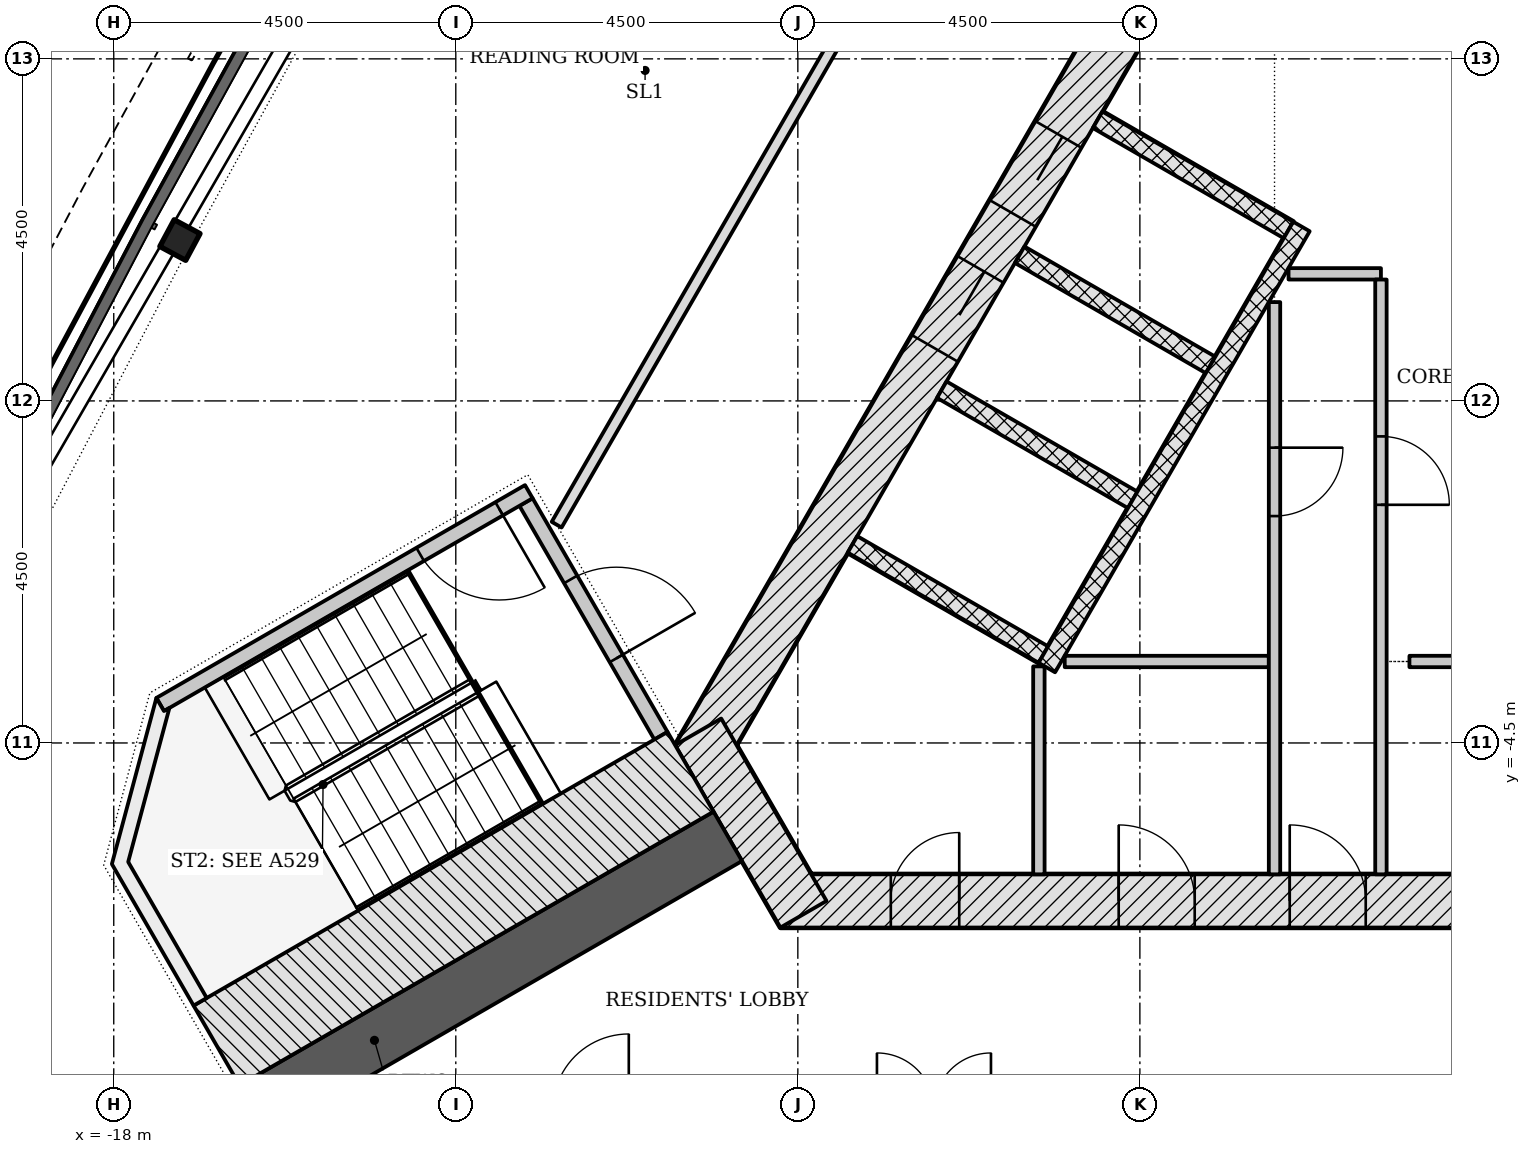
"""IFC4 building model, lengths in metres.
Left out: names, types, materials, properties, quantities, classifications, styles, units other than length and angle.
Written with IfcOpenShell. Run it as: python <this file> out.ifc"""

import sys

from ifc_helpers import new_model, si_unit, direction, frame, frame_2d, origin, origin_2d, place, context, subcontext, project, spatial, polyline, rectangle, i_section, outline, extrude, element, fill, save


model = new_model("IFC4")
c1 = context("Model", 3, precision=1e-05, world=origin(), true_north=direction((0.0, 1.0)))
c2 = subcontext(c1, "Body", "Model", "MODEL_VIEW")
j1 = project(units=[si_unit("LENGTHUNIT", "METRE"), si_unit("PLANEANGLEUNIT", "RADIAN")], contexts=[c1])
p1 = place(None, origin())
s1 = spatial("IfcSite", under=j1, at=p1, CompositionType="ELEMENT")
p2 = place(p1, origin())
s2 = spatial("IfcBuilding", under=s1, at=p2, CompositionType="ELEMENT")
p3 = place(p2, frame((0.0, 0.0, 150.9)))
s3 = spatial("IfcBuildingStorey", under=s2, at=p3, CompositionType="ELEMENT", Elevation=150.9)
p4 = place(p3, frame((-9.229, -6.578, -0.2), z_axis=(0.0, 0.0, 1.0), x_axis=(1.0, 0.0, 0.0)))
e1 = element("IfcWall", 1, at=p4, inside=s3, PredefinedType="SHEAR", context=c2, shape_type="SweptSolid", body=[
    extrude(rectangle(XDim=18.458, YDim=0.7, at=frame_2d((9.229, 0.0))), origin(), (0.0, 0.0, 1.0), 3.6),
])
p5 = place(p4, frame((6.7, 0.0, 0.2)))
e2 = element("IfcOpeningElement", 2, at=p5, cuts=e1, PredefinedType="OPENING", context=c2, shape_type="SweptSolid", body=[
    extrude(rectangle(XDim=1.0, YDim=2.1, at=frame_2d((0.5, 1.05))), frame((0.0, 0.36, 0.0), z_axis=(0.0, -1.0, 0.0), x_axis=(1.0, 0.0, 0.0)), (0.0, 0.0, 1.0), 0.72),
])
p6 = place(p4, frame((1.452, 0.0, 0.2)))
e3 = element("IfcOpeningElement", 3, at=p6, cuts=e1, PredefinedType="OPENING", context=c2, shape_type="SweptSolid", body=[
    extrude(rectangle(XDim=0.9, YDim=2.1, at=frame_2d((0.45, 1.05))), frame((0.0, 0.36, 0.0), z_axis=(0.0, -1.0, 0.0), x_axis=(1.0, 0.0, 0.0)), (0.0, 0.0, 1.0), 0.72),
])
p7 = place(p4, frame((4.45, 0.0, 0.2)))
e4 = element("IfcOpeningElement", 4, at=p7, cuts=e1, PredefinedType="OPENING", context=c2, shape_type="SweptSolid", body=[
    extrude(rectangle(XDim=1.0, YDim=2.1, at=frame_2d((0.5, 1.05))), frame((0.0, 0.36, 0.0), z_axis=(0.0, -1.0, 0.0), x_axis=(1.0, 0.0, 0.0)), (0.0, 0.0, 1.0), 0.72),
])
p8 = place(p4, frame((12.477, 0.0, 0.2)))
e5 = element("IfcOpeningElement", 5, at=p8, cuts=e1, PredefinedType="OPENING", context=c2, shape_type="SweptSolid", body=[
    extrude(rectangle(XDim=1.0, YDim=2.1, at=frame_2d((0.5, 1.05))), frame((0.0, 0.36, 0.0), z_axis=(0.0, -1.0, 0.0), x_axis=(1.0, 0.0, 0.0)), (0.0, 0.0, 1.0), 0.72),
])
p9 = place(p3, frame((-1.083, 11.281, -0.2), z_axis=(0.0, 0.0, 1.0), x_axis=(-0.500001446645, -0.866024568562, 0.0)))
e6 = element("IfcWall", 6, at=p9, inside=s3, PredefinedType="SHEAR", context=c2, shape_type="SweptSolid", body=[
    extrude(rectangle(XDim=18.458, YDim=0.7, at=frame_2d((9.229, 0.0))), origin(), (0.0, 0.0, 1.0), 3.6),
])
p10 = place(p9, frame((8.979, 0.0, 0.2)))
e7 = element("IfcOpeningElement", 7, at=p10, cuts=e6, PredefinedType="OPENING", context=c2, shape_type="SweptSolid", body=[
    extrude(rectangle(XDim=1.2, YDim=2.1, at=frame_2d((0.6, 1.05))), frame((0.0, 0.36, 0.0), z_axis=(0.0, -1.0, 0.0), x_axis=(1.0, 0.0, 0.0)), (0.0, 0.0, 1.0), 0.72),
])
p11 = place(p9, frame((11.029, 0.0, 0.2)))
e8 = element("IfcOpeningElement", 8, at=p11, cuts=e6, PredefinedType="OPENING", context=c2, shape_type="SweptSolid", body=[
    extrude(rectangle(XDim=1.2, YDim=2.1, at=frame_2d((0.6, 1.05))), frame((0.0, 0.36, 0.0), z_axis=(0.0, -1.0, 0.0), x_axis=(1.0, 0.0, 0.0)), (0.0, 0.0, 1.0), 0.72),
])
p12 = place(p3, frame((-10.311, -4.353, -0.2), z_axis=(0.0, 0.0, 1.0), x_axis=(0.500042739161, -0.866000726912, 0.0)))
e9 = element("IfcWall", 9, at=p12, inside=s3, PredefinedType="SHEAR", context=c2, shape_type="SweptSolid", body=[
    extrude(rectangle(XDim=2.771, YDim=0.7, at=frame_2d((1.386, 0.0))), origin(), (0.0, 0.0, 1.0), 3.6),
])
p13 = place(p3, frame((-9.922, -5.728, -0.2), z_axis=(0.0, 0.0, 1.0), x_axis=(-0.86602614826, -0.499998710529, 0.0)))
e10 = element("IfcWall", 10, at=p13, inside=s3, PredefinedType="SHEAR", context=c2, shape_type="SweptSolid", body=[
    extrude(rectangle(XDim=10.735, YDim=0.75, at=frame_2d((5.368, 0.0))), origin(), (0.0, 0.0, 1.0), 3.6),
])
p14 = place(p3, frame((-17.129, 2.116, -0.2), z_axis=(0.0, 0.0, 1.0), x_axis=(-0.472835267666, -0.881150843869, 0.0)))
e11 = element("IfcColumn", 11, at=p14, inside=s3, PredefinedType="COLUMN", context=c2, shape_type="SweptSolid", body=[
    extrude(i_section(OverallWidth=0.399, OverallDepth=0.386, WebThickness=0.021, FlangeThickness=0.033, FilletRadius=0.015, at=origin_2d()), origin(), (0.0, 0.0, 1.0), 3.6),
])
p15 = place(p3, origin())
e12 = element("IfcWall", 12, at=p15, inside=s3, PredefinedType="NOTDEFINED", context=c2, shape_type="SweptSolid", body=[
    extrude(outline(polyline([(-21.704, -5.64), (-23.061, -8.494), (-23.472, -9.826), (-23.507, -11.219), (-23.163, -12.569), (-22.466, -13.775), (-21.469, -14.748), (-20.245, -15.414), (-18.887, -15.724), (-15.736, -15.976), (-15.712, -15.677), (-18.841, -15.427), (-20.138, -15.131), (-21.289, -14.504), (-22.227, -13.589), (-22.882, -12.455), (-23.206, -11.185), (-23.173, -9.875), (-22.781, -8.604), (-21.433, -5.769), (-21.704, -5.64)])), origin(), (0.0, 0.0, 1.0), 3.3),
])
for number, where, z_axis, x_axis in (
    (13, (-5.056, 3.699, -0.2), (0.0, 0.0, 1.0), (0.866, -0.5, 0.0)),
    (14, (-6.081, 1.923, -0.2), (0.0, 0.0, 1.0), (0.866, -0.5, 0.0)),
    (15, (-7.106, 0.148, -0.2), (0.0, 0.0, 1.0), (0.866, -0.5, 0.0)),
    (16, (-8.281, -1.887, -0.2), (0.0, 0.0, 1.0), (0.866, -0.5, 0.0)),
):
    element("IfcWall", number, at=place(p3, frame(where, z_axis=z_axis, x_axis=x_axis)), inside=s3, PredefinedType="PARTITIONING", context=c2, shape_type="SweptSolid", body=[
        extrude(rectangle(XDim=2.9, YDim=0.25, at=frame_2d((1.45, 0.0))), origin(), (0.0, 0.0, 1.0), 3.6),
    ])
p16 = place(p3, frame((-2.374, 2.294, 0.0), z_axis=(0.0, 0.0, 1.0), x_axis=(-0.500003174267, -0.866023571113, 0.0)))
e17 = element("IfcWall", 17, at=p16, inside=s3, PredefinedType="PARTITIONING", context=c2, shape_type="SweptSolid", body=[
    extrude(rectangle(XDim=6.7, YDim=0.25, at=frame_2d((3.35, 0.0))), origin(), (0.0, 0.0, 1.0), 3.4),
])
p17 = place(p3, frame((-5.829, -3.492, 0.0), z_axis=(0.0, 0.0, 1.0), x_axis=(0.0, -1.0, 0.0)))
e18 = element("IfcWall", 18, at=p17, inside=s3, PredefinedType="PARTITIONING", context=c2, shape_type="SweptSolid", body=[
    extrude(rectangle(XDim=2.736, YDim=0.15, at=frame_2d((1.368, 0.0))), origin(), (0.0, 0.0, 1.0), 3.4),
])
p18 = place(p3, frame((-5.489, -3.428, 0.0), z_axis=(0.0, 0.0, 1.0), x_axis=(1.0, 0.0, 0.0)))
e19 = element("IfcWall", 19, at=p18, inside=s3, PredefinedType="PARTITIONING", context=c2, shape_type="SweptSolid", body=[
    extrude(rectangle(XDim=2.685, YDim=0.15, at=frame_2d((1.343, 0.0))), origin(), (0.0, 0.0, 1.0), 3.4),
])
p19 = place(p3, frame((-2.729, 1.3, 0.0), z_axis=(0.0, 0.0, 1.0), x_axis=(0.0, -1.0, 0.0)))
e20 = element("IfcWall", 20, at=p19, inside=s3, PredefinedType="PARTITIONING", context=c2, shape_type="SweptSolid", body=[
    extrude(rectangle(XDim=7.528, YDim=0.15, at=frame_2d((3.764, 0.0))), origin(), (0.0, 0.0, 1.0), 3.4),
])
p20 = place(p19, frame((1.915, 0.0, 0.0)))
e21 = element("IfcOpeningElement", 21, at=p20, cuts=e20, PredefinedType="OPENING", context=c2, shape_type="SweptSolid", body=[
    extrude(rectangle(XDim=0.9, YDim=2.1, at=frame_2d((0.45, 1.05))), frame((0.0, 0.085, 0.0), z_axis=(0.0, -1.0, 0.0), x_axis=(1.0, 0.0, 0.0)), (0.0, 0.0, 1.0), 0.17),
])
p21 = place(p3, frame((-2.544, 1.672, 0.0), z_axis=(0.0, 0.0, 1.0), x_axis=(1.0, 0.0, 0.0)))
e22 = element("IfcWall", 22, at=p21, inside=s3, PredefinedType="PARTITIONING", context=c2, shape_type="SweptSolid", body=[
    extrude(rectangle(XDim=1.216, YDim=0.15, at=frame_2d((0.608, 0.0))), origin(), (0.0, 0.0, 1.0), 3.4),
])
p22 = place(p3, frame((-1.329, 1.597, 0.0), z_axis=(0.0, 0.0, 1.0), x_axis=(0.0, -1.0, 0.0)))
e23 = element("IfcWall", 23, at=p22, inside=s3, PredefinedType="PARTITIONING", context=c2, shape_type="SweptSolid", body=[
    extrude(rectangle(XDim=7.825, YDim=0.15, at=frame_2d((3.913, 0.0))), origin(), (0.0, 0.0, 1.0), 3.4),
])
p23 = place(p22, frame((2.063, 0.0, 0.0)))
e24 = element("IfcOpeningElement", 24, at=p23, cuts=e23, PredefinedType="OPENING", context=c2, shape_type="SweptSolid", body=[
    extrude(rectangle(XDim=0.9, YDim=2.1, at=frame_2d((0.45, 1.05))), frame((0.0, 0.085, 0.0), z_axis=(0.0, -1.0, 0.0), x_axis=(1.0, 0.0, 0.0)), (0.0, 0.0, 1.0), 0.17),
])
p24 = place(p3, frame((-0.954, -3.428, 0.0), z_axis=(0.0, 0.0, 1.0), x_axis=(1.0, 0.0, 0.0)))
e25 = element("IfcWall", 25, at=p24, inside=s3, PredefinedType="PARTITIONING", context=c2, shape_type="SweptSolid", body=[
    extrude(rectangle(XDim=10.08, YDim=0.15, at=frame_2d((5.04, 0.0))), origin(), (0.0, 0.0, 1.0), 3.4),
])
p25 = place(p3, frame((-12.576, -1.331, -0.2), z_axis=(0.0, 0.0, 1.0), x_axis=(0.499970499736, -0.8660424351, 0.0)))
e26 = element("IfcWall", 26, at=p25, inside=s3, PredefinedType="SHEAR", context=c2, shape_type="SweptSolid", body=[
    extrude(rectangle(XDim=3.55, YDim=0.2, at=frame_2d((1.775, 0.0))), origin(), (0.0, 0.0, 1.0), 3.6),
])
p26 = place(p25, frame((1.175, 0.0, 0.2)))
e27 = element("IfcOpeningElement", 27, at=p26, cuts=e26, PredefinedType="OPENING", context=c2, shape_type="SweptSolid", body=[
    extrude(rectangle(XDim=1.2, YDim=2.1, at=frame_2d((0.6, 1.05))), frame((0.0, 0.11, 0.0), z_axis=(0.0, -1.0, 0.0), x_axis=(1.0, 0.0, 0.0)), (0.0, 0.0, 1.0), 0.22),
])
p27 = place(p3, frame((-12.539, -1.194, -0.2), z_axis=(0.0, 0.0, 1.0), x_axis=(-0.866045472092, -0.499965239061, 0.0)))
e28 = element("IfcWall", 28, at=p27, inside=s3, PredefinedType="SHEAR", context=c2, shape_type="SweptSolid", body=[
    extrude(rectangle(XDim=5.6, YDim=0.2, at=frame_2d((2.8, 0.0))), origin(), (0.0, 0.0, 1.0), 3.6),
])
p28 = place(p27, frame((0.45, 0.0, 0.2)))
e29 = element("IfcOpeningElement", 29, at=p28, cuts=e28, PredefinedType="OPENING", context=c2, shape_type="SweptSolid", body=[
    extrude(rectangle(XDim=1.2, YDim=2.1, at=frame_2d((0.6, 1.05))), frame((0.0, 0.11, 0.0), z_axis=(0.0, -1.0, 0.0), x_axis=(1.0, 0.0, 0.0)), (0.0, 0.0, 1.0), 0.22),
])
p29 = place(p3, frame((-10.412, -4.879, -0.2), z_axis=(0.0, 0.0, 1.0), x_axis=(-0.866026919366, -0.499997374926, 0.0)))
e30 = element("IfcWall", 30, at=p29, inside=s3, PredefinedType="SHEAR", context=c2, shape_type="SweptSolid", body=[
    extrude(rectangle(XDim=7.2, YDim=1.211, at=frame_2d((3.6, 0.0))), origin(), (0.0, 0.0, 1.0), 3.6),
])
p30 = place(p3, frame((0.0, 0.0, -0.2)))
e31 = element("IfcWall", 31, at=p30, inside=s3, PredefinedType="SHEAR", context=c2, shape_type="SweptSolid", body=[
    extrude(outline(polyline([(-17.439, -3.907), (-18.025, -6.093), (-16.95, -7.955), (-16.777, -7.855), (-17.81, -6.065), (-17.267, -4.039), (-17.339, -4.081), (-17.339, -4.081), (-17.339, -4.081), (-17.339, -4.081), (-17.339, -4.081), (-17.339, -4.081), (-17.339, -4.081), (-17.339, -4.081), (-17.339, -4.081), (-17.339, -4.081), (-17.339, -4.081), (-17.339, -4.081), (-17.339, -4.081), (-17.339, -4.081), (-17.339, -4.081), (-17.339, -4.081), (-17.339, -4.081), (-17.439, -3.907)])), origin(), (0.0, 0.0, 1.0), 3.6),
])
p31 = place(p3, frame((-7.435, 6.578, 0.0), z_axis=(0.0, 0.0, 1.0), x_axis=(-0.499998996204, -0.866025983326, 0.0)))
e32 = element("IfcWall", 32, at=p31, inside=s3, PredefinedType="PARTITIONING", context=c2, shape_type="SweptSolid", body=[
    extrude(rectangle(XDim=9.476, YDim=0.15, at=frame_2d((4.738, 0.0))), origin(), (0.0, 0.0, 1.0), 2.847),
])
p32 = place(p10, origin())
e33 = element("IfcDoor", 33, at=p32, inside=s3, OperationType="DOUBLE_DOOR_SLIDING", PredefinedType="DOOR", context=c2, shape_type="SweptSolid", body=[
    extrude(rectangle(XDim=1.2, YDim=2.1, at=frame_2d((0.6, 1.05))), frame((0.0, 0.025, 0.0), z_axis=(0.0, -1.0, 0.0), x_axis=(1.0, 0.0, 0.0)), (0.0, 0.0, 1.0), 0.05),
])
fill(e7, e33)
p33 = place(p11, origin())
e34 = element("IfcDoor", 34, at=p33, inside=s3, OperationType="DOUBLE_DOOR_SLIDING", PredefinedType="DOOR", context=c2, shape_type="SweptSolid", body=[
    extrude(rectangle(XDim=1.2, YDim=2.1, at=frame_2d((0.6, 1.05))), frame((0.0, 0.025, 0.0), z_axis=(0.0, -1.0, 0.0), x_axis=(1.0, 0.0, 0.0)), (0.0, 0.0, 1.0), 0.05),
])
fill(e8, e34)
p34 = place(p5, origin())
e35 = element("IfcDoor", 35, at=p34, inside=s3, OperationType="SINGLE_SWING_LEFT", PredefinedType="DOOR", context=c2, shape_type="SweptSolid", body=[
    extrude(rectangle(XDim=1.0, YDim=2.1, at=frame_2d((0.5, 1.05))), frame((0.0, 0.075, 0.0), z_axis=(0.0, -1.0, 0.0), x_axis=(1.0, 0.0, 0.0)), (0.0, 0.0, 1.0), 0.15),
])
fill(e2, e35)
p35 = place(p6, origin())
e36 = element("IfcDoor", 36, at=p35, inside=s3, OperationType="SINGLE_SWING_RIGHT", PredefinedType="DOOR", context=c2, shape_type="SweptSolid", body=[
    extrude(rectangle(XDim=0.9, YDim=2.1, at=frame_2d((0.45, 1.05))), frame((0.0, 0.075, 0.0), z_axis=(0.0, -1.0, 0.0), x_axis=(1.0, 0.0, 0.0)), (0.0, 0.0, 1.0), 0.15),
])
fill(e3, e36)
p36 = place(p7, origin())
e37 = element("IfcDoor", 37, at=p36, inside=s3, OperationType="SINGLE_SWING_LEFT", PredefinedType="DOOR", context=c2, shape_type="SweptSolid", body=[
    extrude(rectangle(XDim=1.0, YDim=2.1, at=frame_2d((0.5, 1.05))), frame((0.0, 0.075, 0.0), z_axis=(0.0, -1.0, 0.0), x_axis=(1.0, 0.0, 0.0)), (0.0, 0.0, 1.0), 0.15),
])
fill(e4, e37)
p37 = place(p20, origin())
e38 = element("IfcDoor", 38, at=p37, inside=s3, OperationType="SINGLE_SWING_LEFT", PredefinedType="DOOR", context=c2, shape_type="SweptSolid", body=[
    extrude(rectangle(XDim=0.9, YDim=2.1, at=frame_2d((0.45, 1.05))), frame((0.0, 0.025, 0.0), z_axis=(0.0, -1.0, 0.0), x_axis=(1.0, 0.0, 0.0)), (0.0, 0.0, 1.0), 0.05),
])
fill(e21, e38)
p38 = place(p23, origin())
e39 = element("IfcDoor", 39, at=p38, inside=s3, OperationType="SINGLE_SWING_RIGHT", PredefinedType="DOOR", context=c2, shape_type="SweptSolid", body=[
    extrude(rectangle(XDim=0.9, YDim=2.1, at=frame_2d((0.45, 1.05))), frame((0.0, 0.025, 0.0), z_axis=(0.0, -1.0, 0.0), x_axis=(1.0, 0.0, 0.0)), (0.0, 0.0, 1.0), 0.05),
])
fill(e24, e39)
p39 = place(p26, origin())
e40 = element("IfcDoor", 40, at=p39, inside=s3, OperationType="SINGLE_SWING_RIGHT", PredefinedType="DOOR", context=c2, shape_type="SweptSolid", body=[
    extrude(rectangle(XDim=1.2, YDim=2.1, at=frame_2d((0.6, 1.05))), frame((0.0, 0.025, 0.0), z_axis=(0.0, -1.0, 0.0), x_axis=(1.0, 0.0, 0.0)), (0.0, 0.0, 1.0), 0.05),
])
fill(e27, e40)
p40 = place(p28, origin())
e41 = element("IfcDoor", 41, at=p40, inside=s3, OperationType="SINGLE_SWING_LEFT", PredefinedType="DOOR", context=c2, shape_type="SweptSolid", body=[
    extrude(rectangle(XDim=1.2, YDim=2.1, at=frame_2d((0.6, 1.05))), frame((0.0, 0.025, 0.0), z_axis=(0.0, -1.0, 0.0), x_axis=(1.0, 0.0, 0.0)), (0.0, 0.0, 1.0), 0.05),
])
fill(e29, e41)
save(model, sys.argv[1])
